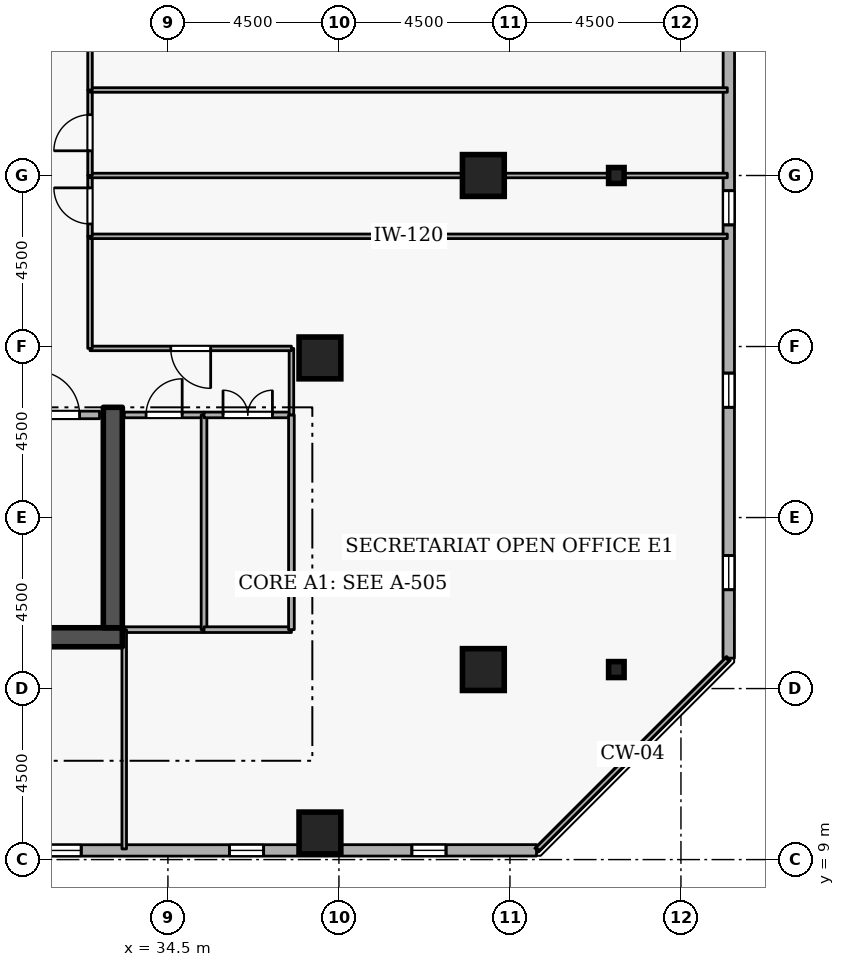
"""IFC4 building model, lengths in metres.
Left out: names, types, materials, properties, quantities, classifications, styles, units other than length and angle.
Written with IfcOpenShell. Run it as: python <this file> out.ifc"""

import sys

from ifc_helpers import new_model, si_unit, direction, frame, frame_2d, origin, origin_2d, place, context, subcontext, project, spatial, rectangle, i_section, extrude, element, fill, save


model = new_model("IFC4")
c1 = context("Model", 3, precision=1e-05, world=origin(), true_north=direction((0.0, 1.0)))
c2 = subcontext(c1, "Body", "Model", "MODEL_VIEW")
j1 = project(units=[si_unit("LENGTHUNIT", "METRE"), si_unit("PLANEANGLEUNIT", "RADIAN")], contexts=[c1])
p1 = place(None, origin())
s1 = spatial("IfcSite", under=j1, at=p1, CompositionType="ELEMENT")
p2 = place(p1, origin())
s2 = spatial("IfcBuilding", under=s1, at=p2, CompositionType="ELEMENT")
p3 = place(p2, frame((0.0, 0.0, 189.3)))
s3 = spatial("IfcBuildingStorey", under=s2, at=p3, CompositionType="ELEMENT", Elevation=189.3)
p4 = place(p3, frame((17.7, 14.85, 0.0), z_axis=(0.0, 0.0, 1.0), x_axis=(1.0, 0.0, 0.0)))
e1 = element("IfcWall", 1, at=p4, inside=s3, PredefinedType="SHEAR", context=c2, shape_type="SweptSolid", body=[
    extrude(rectangle(XDim=15.6, YDim=0.5, at=frame_2d((7.8, 0.0))), origin(), (0.0, 0.0, 1.0), 3.6),
])
p5 = place(p3, frame((33.05, 15.1, 0.0), z_axis=(0.0, 0.0, 1.0), x_axis=(0.0, 1.0, 0.0)))
e2 = element("IfcWall", 2, at=p5, inside=s3, PredefinedType="SHEAR", context=c2, shape_type="SweptSolid", body=[
    extrude(rectangle(XDim=5.8, YDim=0.5, at=frame_2d((2.9, 0.0))), origin(), (0.0, 0.0, 1.0), 3.6),
])
for number, where, z_axis, x_axis in (
    (3, (38.5, 9.7, 0.0), (0.0, 0.0, 1.0), (1.0, 0.0, 0.0)),
    (4, (42.8, 14.0, 0.0), (0.0, 0.0, 1.0), (1.0, 0.0, 0.0)),
    (5, (42.8, 27.0, 0.0), (0.0, 0.0, 1.0), (1.0, 0.0, 0.0)),
    (6, (38.5, 22.2, 0.0), (0.0, 0.0, 1.0), (1.0, 0.0, 0.0)),
):
    element("IfcColumn", number, at=place(p3, frame(where, z_axis=z_axis, x_axis=x_axis)), inside=s3, PredefinedType="COLUMN", context=c2, shape_type="SweptSolid", body=[
        extrude(rectangle(XDim=1.1, YDim=1.1, at=origin_2d()), origin(), (0.0, 0.0, 1.0), 3.6),
    ])
for number, where, z_axis, x_axis in (
    (7, (46.3, 14.0, 0.0), (0.0, 0.0, 1.0), (1.0, 0.0, 0.0)),
    (8, (46.3, 27.0, 0.0), (0.0, 0.0, 1.0), (1.0, 0.0, 0.0)),
):
    element("IfcColumn", number, at=place(p3, frame(where, z_axis=z_axis, x_axis=x_axis)), inside=s3, PredefinedType="COLUMN", context=c2, shape_type="SweptSolid", body=[
        extrude(i_section(OverallWidth=0.407, OverallDepth=0.419, WebThickness=0.031, FlangeThickness=0.049, FilletRadius=0.015, at=origin_2d()), origin(), (0.0, 0.0, 1.0), 3.6),
    ])
p6 = place(p3, frame((10.319, 9.235, 0.0), z_axis=(0.0, 0.0, 1.0), x_axis=(0.999999969988, 0.000244999128, 0.0)))
e9 = element("IfcWall", 9, at=p6, inside=s3, PredefinedType="STANDARD", context=c2, shape_type="SweptSolid", body=[
    extrude(rectangle(XDim=33.881, YDim=0.3, at=frame_2d((16.94, 0.0))), origin(), (0.0, 0.0, 1.0), 2.7),
])
p7 = place(p6, frame((6.6, 0.0, 0.72)))
e10 = element("IfcOpeningElement", 10, at=p7, cuts=e9, PredefinedType="OPENING", context=c2, shape_type="SweptSolid", body=[
    extrude(rectangle(XDim=0.9, YDim=1.75, at=frame_2d((0.45, 0.875))), frame((0.0, 0.16, 0.0), z_axis=(0.0, -1.0, 0.0), x_axis=(1.0, 0.0, 0.0)), (0.0, 0.0, 1.0), 0.32),
])
p8 = place(p6, frame((11.4, 0.0, 0.72)))
e11 = element("IfcOpeningElement", 11, at=p8, cuts=e9, PredefinedType="OPENING", context=c2, shape_type="SweptSolid", body=[
    extrude(rectangle(XDim=0.9, YDim=1.75, at=frame_2d((0.45, 0.875))), frame((0.0, 0.16, 0.0), z_axis=(0.0, -1.0, 0.0), x_axis=(1.0, 0.0, 0.0)), (0.0, 0.0, 1.0), 0.32),
])
p9 = place(p6, frame((21.0, 0.0, 0.72)))
e12 = element("IfcOpeningElement", 12, at=p9, cuts=e9, PredefinedType="OPENING", context=c2, shape_type="SweptSolid", body=[
    extrude(rectangle(XDim=0.9, YDim=1.75, at=frame_2d((0.45, 0.875))), frame((0.0, 0.16, 0.0), z_axis=(0.0, -1.0, 0.0), x_axis=(1.0, 0.0, 0.0)), (0.0, 0.0, 1.0), 0.32),
])
p10 = place(p6, frame((25.8, 0.0, 0.72)))
e13 = element("IfcOpeningElement", 13, at=p10, cuts=e9, PredefinedType="OPENING", context=c2, shape_type="SweptSolid", body=[
    extrude(rectangle(XDim=0.9, YDim=1.75, at=frame_2d((0.45, 0.875))), frame((0.0, 0.16, 0.0), z_axis=(0.0, -1.0, 0.0), x_axis=(1.0, 0.0, 0.0)), (0.0, 0.0, 1.0), 0.32),
])
p11 = place(p6, frame((30.6, 0.0, 0.72)))
e14 = element("IfcOpeningElement", 14, at=p11, cuts=e9, PredefinedType="OPENING", context=c2, shape_type="SweptSolid", body=[
    extrude(rectangle(XDim=0.9, YDim=1.75, at=frame_2d((0.45, 0.875))), frame((0.0, 0.16, 0.0), z_axis=(0.0, -1.0, 0.0), x_axis=(1.0, 0.0, 0.0)), (0.0, 0.0, 1.0), 0.32),
])
p12 = place(p3, frame((49.256, 14.301, 0.0), z_axis=(0.0, 0.0, 1.0), x_axis=(0.000244999128, 0.999999969988, 0.0)))
e15 = element("IfcWall", 15, at=p12, inside=s3, PredefinedType="STANDARD", context=c2, shape_type="SweptSolid", body=[
    extrude(rectangle(XDim=33.881, YDim=0.3, at=frame_2d((16.94, 0.0))), origin(), (0.0, 0.0, 1.0), 2.7),
])
p13 = place(p12, frame((1.8, 0.0, 0.72)))
e16 = element("IfcOpeningElement", 16, at=p13, cuts=e15, PredefinedType="OPENING", context=c2, shape_type="SweptSolid", body=[
    extrude(rectangle(XDim=0.9, YDim=1.75, at=frame_2d((0.45, 0.875))), frame((0.0, 0.16, 0.0), z_axis=(0.0, -1.0, 0.0), x_axis=(1.0, 0.0, 0.0)), (0.0, 0.0, 1.0), 0.32),
])
p14 = place(p12, frame((6.6, 0.0, 0.72)))
e17 = element("IfcOpeningElement", 17, at=p14, cuts=e15, PredefinedType="OPENING", context=c2, shape_type="SweptSolid", body=[
    extrude(rectangle(XDim=0.9, YDim=1.75, at=frame_2d((0.45, 0.875))), frame((0.0, 0.16, 0.0), z_axis=(0.0, -1.0, 0.0), x_axis=(1.0, 0.0, 0.0)), (0.0, 0.0, 1.0), 0.32),
])
p15 = place(p12, frame((11.4, 0.0, 0.72)))
e18 = element("IfcOpeningElement", 18, at=p15, cuts=e15, PredefinedType="OPENING", context=c2, shape_type="SweptSolid", body=[
    extrude(rectangle(XDim=0.9, YDim=1.75, at=frame_2d((0.45, 0.875))), frame((0.0, 0.16, 0.0), z_axis=(0.0, -1.0, 0.0), x_axis=(1.0, 0.0, 0.0)), (0.0, 0.0, 1.0), 0.32),
])
p16 = place(p12, frame((16.2, 0.0, 0.72)))
e19 = element("IfcOpeningElement", 19, at=p16, cuts=e15, PredefinedType="OPENING", context=c2, shape_type="SweptSolid", body=[
    extrude(rectangle(XDim=0.9, YDim=1.75, at=frame_2d((0.45, 0.875))), frame((0.0, 0.16, 0.0), z_axis=(0.0, -1.0, 0.0), x_axis=(1.0, 0.0, 0.0)), (0.0, 0.0, 1.0), 0.32),
])
p17 = place(p12, frame((21.0, 0.0, 0.72)))
e20 = element("IfcOpeningElement", 20, at=p17, cuts=e15, PredefinedType="OPENING", context=c2, shape_type="SweptSolid", body=[
    extrude(rectangle(XDim=0.9, YDim=1.75, at=frame_2d((0.45, 0.875))), frame((0.0, 0.16, 0.0), z_axis=(0.0, -1.0, 0.0), x_axis=(1.0, 0.0, 0.0)), (0.0, 0.0, 1.0), 0.32),
])
p18 = place(p12, frame((25.8, 0.0, 0.72)))
e21 = element("IfcOpeningElement", 21, at=p18, cuts=e15, PredefinedType="OPENING", context=c2, shape_type="SweptSolid", body=[
    extrude(rectangle(XDim=0.9, YDim=1.75, at=frame_2d((0.45, 0.875))), frame((0.0, 0.16, 0.0), z_axis=(0.0, -1.0, 0.0), x_axis=(1.0, 0.0, 0.0)), (0.0, 0.0, 1.0), 0.32),
])
p19 = place(p12, frame((30.6, 0.0, 0.72)))
e22 = element("IfcOpeningElement", 22, at=p19, cuts=e15, PredefinedType="OPENING", context=c2, shape_type="SweptSolid", body=[
    extrude(rectangle(XDim=0.9, YDim=1.75, at=frame_2d((0.45, 0.875))), frame((0.0, 0.16, 0.0), z_axis=(0.0, -1.0, 0.0), x_axis=(1.0, 0.0, 0.0)), (0.0, 0.0, 1.0), 0.32),
])
p20 = place(p3, frame((30.5, 20.7, 0.0), z_axis=(0.0, 0.0, 1.0), x_axis=(1.0, 0.0, 0.0)))
e23 = element("IfcWall", 23, at=p20, inside=s3, PredefinedType="STANDARD", context=c2, shape_type="SweptSolid", body=[
    extrude(rectangle(XDim=2.2, YDim=0.2, at=frame_2d((1.1, 0.0))), origin(), (0.0, 0.0, 1.0), 3.34),
])
p21 = place(p20, frame((0.525, 0.0, 0.0)))
e24 = element("IfcOpeningElement", 24, at=p21, cuts=e23, PredefinedType="OPENING", context=c2, shape_type="SweptSolid", body=[
    extrude(rectangle(XDim=1.15, YDim=2.1, at=frame_2d((0.575, 1.05))), frame((0.0, 0.11, 0.0), z_axis=(0.0, -1.0, 0.0), x_axis=(1.0, 0.0, 0.0)), (0.0, 0.0, 1.0), 0.22),
])
p22 = place(p3, frame((35.45, 15.05, 0.0), z_axis=(0.0, 0.0, 1.0), x_axis=(-1.0, 0.0, 0.0)))
e25 = element("IfcWall", 25, at=p22, inside=s3, PredefinedType="PARTITIONING", context=c2, shape_type="SweptSolid", body=[
    extrude(rectangle(XDim=2.1, YDim=0.15, at=frame_2d((1.05, 0.0))), origin(), (0.0, 0.0, 1.0), 3.34),
])
p23 = place(p3, frame((33.35, 20.7, 0.0), z_axis=(0.0, 0.0, 1.0), x_axis=(1.0, 0.0, 0.0)))
e26 = element("IfcWall", 26, at=p23, inside=s3, PredefinedType="PARTITIONING", context=c2, shape_type="SweptSolid", body=[
    extrude(rectangle(XDim=2.1, YDim=0.15, at=frame_2d((1.05, 0.0))), origin(), (0.0, 0.0, 1.0), 3.34),
])
p24 = place(p23, frame((0.575, 0.0, 0.0)))
e27 = element("IfcOpeningElement", 27, at=p24, cuts=e26, PredefinedType="OPENING", context=c2, shape_type="SweptSolid", body=[
    extrude(rectangle(XDim=0.95, YDim=2.1, at=frame_2d((0.475, 1.05))), frame((0.0, 0.085, 0.0), z_axis=(0.0, -1.0, 0.0), x_axis=(1.0, 0.0, 0.0)), (0.0, 0.0, 1.0), 0.17),
])
p25 = place(p3, frame((35.45, 20.7, 0.0), z_axis=(0.0, 0.0, 1.0), x_axis=(0.0, -1.0, 0.0)))
e28 = element("IfcWall", 28, at=p25, inside=s3, PredefinedType="PARTITIONING", context=c2, shape_type="SweptSolid", body=[
    extrude(rectangle(XDim=5.65, YDim=0.15, at=frame_2d((2.825, 0.0))), origin(), (0.0, 0.0, 1.0), 3.34),
])
p26 = place(p3, frame((37.75, 15.05, 0.0), z_axis=(0.0, 0.0, 1.0), x_axis=(-1.0, 0.0, 0.0)))
e29 = element("IfcWall", 29, at=p26, inside=s3, PredefinedType="PARTITIONING", context=c2, shape_type="SweptSolid", body=[
    extrude(rectangle(XDim=2.3, YDim=0.15, at=frame_2d((1.15, 0.0))), origin(), (0.0, 0.0, 1.0), 3.34),
])
p27 = place(p3, frame((35.45, 20.7, 0.0), z_axis=(0.0, 0.0, 1.0), x_axis=(1.0, 0.0, 0.0)))
e30 = element("IfcWall", 30, at=p27, inside=s3, PredefinedType="PARTITIONING", context=c2, shape_type="SweptSolid", body=[
    extrude(rectangle(XDim=2.3, YDim=0.15, at=frame_2d((1.15, 0.0))), origin(), (0.0, 0.0, 1.0), 3.34),
])
p28 = place(p27, frame((0.5, 0.0, 0.0)))
e31 = element("IfcOpeningElement", 31, at=p28, cuts=e30, PredefinedType="OPENING", context=c2, shape_type="SweptSolid", body=[
    extrude(rectangle(XDim=1.3, YDim=2.12, at=frame_2d((0.65, 1.06))), frame((0.0, 0.085, 0.0), z_axis=(0.0, -1.0, 0.0), x_axis=(1.0, 0.0, 0.0)), (0.0, 0.0, 1.0), 0.17),
])
p29 = place(p3, frame((37.75, 20.7, 0.0), z_axis=(0.0, 0.0, 1.0), x_axis=(0.0, -1.0, 0.0)))
e32 = element("IfcWall", 32, at=p29, inside=s3, PredefinedType="PARTITIONING", context=c2, shape_type="SweptSolid", body=[
    extrude(rectangle(XDim=5.65, YDim=0.15, at=frame_2d((2.825, 0.0))), origin(), (0.0, 0.0, 1.0), 3.34),
])
p30 = place(p3, frame((37.75, 20.7, 0.0), z_axis=(0.0, 0.0, 1.0), x_axis=(0.0, 1.0, 0.0)))
e33 = element("IfcWall", 33, at=p30, inside=s3, PredefinedType="PARTITIONING", context=c2, shape_type="SweptSolid", body=[
    extrude(rectangle(XDim=1.75, YDim=0.12, at=frame_2d((0.875, 0.0))), origin(), (0.0, 0.0, 1.0), 3.34),
])
p31 = place(p3, frame((37.75, 22.45, 0.0), z_axis=(0.0, 0.0, 1.0), x_axis=(-1.0, 0.0, 0.0)))
e34 = element("IfcWall", 34, at=p31, inside=s3, PredefinedType="PARTITIONING", context=c2, shape_type="SweptSolid", body=[
    extrude(rectangle(XDim=5.3, YDim=0.12, at=frame_2d((2.65, 0.0))), origin(), (0.0, 0.0, 1.0), 3.34),
])
p32 = place(p31, frame((2.125, 0.0, 0.0)))
e35 = element("IfcOpeningElement", 35, at=p32, cuts=e34, PredefinedType="OPENING", context=c2, shape_type="SweptSolid", body=[
    extrude(rectangle(XDim=1.05, YDim=2.1, at=frame_2d((0.525, 1.05))), frame((0.0, 0.07, 0.0), z_axis=(0.0, -1.0, 0.0), x_axis=(1.0, 0.0, 0.0)), (0.0, 0.0, 1.0), 0.14),
])
p33 = place(p3, frame((32.45, 22.45, 0.0), z_axis=(0.0, 0.0, 1.0), x_axis=(0.0, 1.0, 0.0)))
e36 = element("IfcWall", 36, at=p33, inside=s3, PredefinedType="PARTITIONING", context=c2, shape_type="SweptSolid", body=[
    extrude(rectangle(XDim=2.95, YDim=0.12, at=frame_2d((1.475, 0.0))), origin(), (0.0, 0.0, 1.0), 3.34),
])
p34 = place(p3, frame((32.45, 25.4, 0.0), z_axis=(0.0, 0.0, 1.0), x_axis=(1.0, 0.0, 0.0)))
e37 = element("IfcWall", 37, at=p34, inside=s3, PredefinedType="PARTITIONING", context=c2, shape_type="SweptSolid", body=[
    extrude(rectangle(XDim=16.77, YDim=0.12, at=frame_2d((8.385, 0.0))), origin(), (0.0, 0.0, 1.0), 3.34),
])
p35 = place(p3, frame((49.22, 14.267, 0.0), z_axis=(0.0, 0.0, 1.0), x_axis=(-0.707106781187, -0.707106781187, 0.0)))
e38 = element("IfcWall", 38, at=p35, inside=s3, PredefinedType="PARTITIONING", context=c2, shape_type="SweptSolid", body=[
    extrude(rectangle(XDim=7.052, YDim=0.12, at=frame_2d((3.526, 0.0))), origin(), (0.0, 0.0, 1.0), 3.34),
])
p36 = place(p3, frame((33.35, 9.28, 0.0), z_axis=(0.0, 0.0, 1.0), x_axis=(0.0, 1.0, 0.0)))
e39 = element("IfcWall", 39, at=p36, inside=s3, PredefinedType="PARTITIONING", context=c2, shape_type="SweptSolid", body=[
    extrude(rectangle(XDim=5.77, YDim=0.12, at=frame_2d((2.885, 0.0))), origin(), (0.0, 0.0, 1.0), 2.545),
])
p37 = place(p3, frame((32.45, 25.4, 0.0), z_axis=(0.0, 0.0, 1.0), x_axis=(0.0, 1.0, 0.0)))
e40 = element("IfcWall", 40, at=p37, inside=s3, PredefinedType="PARTITIONING", context=c2, shape_type="SweptSolid", body=[
    extrude(rectangle(XDim=1.6, YDim=0.12, at=frame_2d((0.8, 0.0))), origin(), (0.0, 0.0, 1.0), 3.34),
])
p38 = place(p37, frame((0.325, 0.0, 0.0)))
e41 = element("IfcOpeningElement", 41, at=p38, cuts=e40, PredefinedType="OPENING", context=c2, shape_type="SweptSolid", body=[
    extrude(rectangle(XDim=0.95, YDim=2.1, at=frame_2d((0.475, 1.05))), frame((0.0, 0.07, 0.0), z_axis=(0.0, -1.0, 0.0), x_axis=(1.0, 0.0, 0.0)), (0.0, 0.0, 1.0), 0.14),
])
p39 = place(p3, frame((32.45, 27.0, 0.0), z_axis=(0.0, 0.0, 1.0), x_axis=(1.0, 0.0, 0.0)))
e42 = element("IfcWall", 42, at=p39, inside=s3, PredefinedType="PARTITIONING", context=c2, shape_type="SweptSolid", body=[
    extrude(rectangle(XDim=16.77, YDim=0.12, at=frame_2d((8.385, 0.0))), origin(), (0.0, 0.0, 1.0), 2.878),
])
p40 = place(p3, frame((32.45, 27.0, 0.0), z_axis=(0.0, 0.0, 1.0), x_axis=(0.0, 1.0, 0.0)))
e43 = element("IfcWall", 43, at=p40, inside=s3, PredefinedType="PARTITIONING", context=c2, shape_type="SweptSolid", body=[
    extrude(rectangle(XDim=2.25, YDim=0.12, at=frame_2d((1.125, 0.0))), origin(), (0.0, 0.0, 1.0), 3.34),
])
p41 = place(p40, frame((0.65, 0.0, 0.0)))
e44 = element("IfcOpeningElement", 44, at=p41, cuts=e43, PredefinedType="OPENING", context=c2, shape_type="SweptSolid", body=[
    extrude(rectangle(XDim=0.95, YDim=2.1, at=frame_2d((0.475, 1.05))), frame((0.0, 0.07, 0.0), z_axis=(0.0, -1.0, 0.0), x_axis=(1.0, 0.0, 0.0)), (0.0, 0.0, 1.0), 0.14),
])
p42 = place(p3, frame((32.45, 29.25, 0.0), z_axis=(0.0, 0.0, 1.0), x_axis=(1.0, 0.0, 0.0)))
e45 = element("IfcWall", 45, at=p42, inside=s3, PredefinedType="PARTITIONING", context=c2, shape_type="SweptSolid", body=[
    extrude(rectangle(XDim=16.77, YDim=0.12, at=frame_2d((8.385, 0.0))), origin(), (0.0, 0.0, 1.0), 3.34),
])
p43 = place(p3, frame((32.45, 29.25, 0.0), z_axis=(0.0, 0.0, 1.0), x_axis=(0.0, 1.0, 0.0)))
e46 = element("IfcWall", 46, at=p43, inside=s3, PredefinedType="PARTITIONING", context=c2, shape_type="SweptSolid", body=[
    extrude(rectangle(XDim=2.3, YDim=0.12, at=frame_2d((1.15, 0.0))), origin(), (0.0, 0.0, 1.0), 3.34),
])
p44 = place(p9, origin())
e47 = element("IfcWindow", 47, at=p44, inside=s3, PartitioningType="SINGLE_PANEL", PredefinedType="WINDOW", context=c2, shape_type="SweptSolid", body=[
    extrude(rectangle(XDim=0.9, YDim=1.75, at=frame_2d((0.45, 0.875))), frame((0.0, 0.03, 0.0), z_axis=(0.0, -1.0, 0.0), x_axis=(1.0, 0.0, 0.0)), (0.0, 0.0, 1.0), 0.06),
])
fill(e12, e47)
p45 = place(p10, origin())
e48 = element("IfcWindow", 48, at=p45, inside=s3, PartitioningType="SINGLE_PANEL", PredefinedType="WINDOW", context=c2, shape_type="SweptSolid", body=[
    extrude(rectangle(XDim=0.9, YDim=1.75, at=frame_2d((0.45, 0.875))), frame((0.0, 0.03, 0.0), z_axis=(0.0, -1.0, 0.0), x_axis=(1.0, 0.0, 0.0)), (0.0, 0.0, 1.0), 0.06),
])
fill(e13, e48)
p46 = place(p11, origin())
e49 = element("IfcWindow", 49, at=p46, inside=s3, PartitioningType="SINGLE_PANEL", PredefinedType="WINDOW", context=c2, shape_type="SweptSolid", body=[
    extrude(rectangle(XDim=0.9, YDim=1.75, at=frame_2d((0.45, 0.875))), frame((0.0, 0.03, 0.0), z_axis=(0.0, -1.0, 0.0), x_axis=(1.0, 0.0, 0.0)), (0.0, 0.0, 1.0), 0.06),
])
fill(e14, e49)
p47 = place(p13, origin())
e50 = element("IfcWindow", 50, at=p47, inside=s3, PartitioningType="SINGLE_PANEL", PredefinedType="WINDOW", context=c2, shape_type="SweptSolid", body=[
    extrude(rectangle(XDim=0.9, YDim=1.75, at=frame_2d((0.45, 0.875))), frame((0.0, 0.03, 0.0), z_axis=(0.0, -1.0, 0.0), x_axis=(1.0, 0.0, 0.0)), (0.0, 0.0, 1.0), 0.06),
])
fill(e16, e50)
p48 = place(p14, origin())
e51 = element("IfcWindow", 51, at=p48, inside=s3, PartitioningType="SINGLE_PANEL", PredefinedType="WINDOW", context=c2, shape_type="SweptSolid", body=[
    extrude(rectangle(XDim=0.9, YDim=1.75, at=frame_2d((0.45, 0.875))), frame((0.0, 0.03, 0.0), z_axis=(0.0, -1.0, 0.0), x_axis=(1.0, 0.0, 0.0)), (0.0, 0.0, 1.0), 0.06),
])
fill(e17, e51)
p49 = place(p15, origin())
e52 = element("IfcWindow", 52, at=p49, inside=s3, PartitioningType="SINGLE_PANEL", PredefinedType="WINDOW", context=c2, shape_type="SweptSolid", body=[
    extrude(rectangle(XDim=0.9, YDim=1.75, at=frame_2d((0.45, 0.875))), frame((0.0, 0.03, 0.0), z_axis=(0.0, -1.0, 0.0), x_axis=(1.0, 0.0, 0.0)), (0.0, 0.0, 1.0), 0.06),
])
fill(e18, e52)
p50 = place(p21, origin())
e53 = element("IfcDoor", 53, at=p50, inside=s3, OperationType="SINGLE_SWING_LEFT", PredefinedType="DOOR", context=c2, shape_type="SweptSolid", body=[
    extrude(rectangle(XDim=1.15, YDim=2.1, at=frame_2d((0.575, 1.05))), frame((0.0, 0.025, 0.0), z_axis=(0.0, -1.0, 0.0), x_axis=(1.0, 0.0, 0.0)), (0.0, 0.0, 1.0), 0.05),
])
fill(e24, e53)
p51 = place(p24, origin())
e54 = element("IfcDoor", 54, at=p51, inside=s3, OperationType="SINGLE_SWING_RIGHT", PredefinedType="DOOR", context=c2, shape_type="SweptSolid", body=[
    extrude(rectangle(XDim=0.95, YDim=2.1, at=frame_2d((0.475, 1.05))), frame((0.0, 0.025, 0.0), z_axis=(0.0, -1.0, 0.0), x_axis=(1.0, 0.0, 0.0)), (0.0, 0.0, 1.0), 0.05),
])
fill(e27, e54)
p52 = place(p28, origin())
e55 = element("IfcDoor", 55, at=p52, inside=s3, OperationType="DOUBLE_DOOR_SINGLE_SWING", PredefinedType="DOOR", context=c2, shape_type="SweptSolid", body=[
    extrude(rectangle(XDim=1.3, YDim=2.12, at=frame_2d((0.65, 1.06))), frame((0.0, 0.025, 0.0), z_axis=(0.0, -1.0, 0.0), x_axis=(1.0, 0.0, 0.0)), (0.0, 0.0, 1.0), 0.05),
])
fill(e31, e55)
p53 = place(p32, origin())
e56 = element("IfcDoor", 56, at=p53, inside=s3, OperationType="SINGLE_SWING_LEFT", PredefinedType="DOOR", context=c2, shape_type="SweptSolid", body=[
    extrude(rectangle(XDim=1.05, YDim=2.1, at=frame_2d((0.525, 1.05))), frame((0.0, 0.025, 0.0), z_axis=(0.0, -1.0, 0.0), x_axis=(1.0, 0.0, 0.0)), (0.0, 0.0, 1.0), 0.05),
])
fill(e35, e56)
p54 = place(p38, origin())
e57 = element("IfcDoor", 57, at=p54, inside=s3, OperationType="SINGLE_SWING_RIGHT", PredefinedType="DOOR", context=c2, shape_type="SweptSolid", body=[
    extrude(rectangle(XDim=0.95, YDim=2.1, at=frame_2d((0.475, 1.05))), frame((0.0, 0.025, 0.0), z_axis=(0.0, -1.0, 0.0), x_axis=(1.0, 0.0, 0.0)), (0.0, 0.0, 1.0), 0.05),
])
fill(e41, e57)
p55 = place(p41, origin())
e58 = element("IfcDoor", 58, at=p55, inside=s3, OperationType="SINGLE_SWING_LEFT", PredefinedType="DOOR", context=c2, shape_type="SweptSolid", body=[
    extrude(rectangle(XDim=0.95, YDim=2.1, at=frame_2d((0.475, 1.05))), frame((0.0, 0.025, 0.0), z_axis=(0.0, -1.0, 0.0), x_axis=(1.0, 0.0, 0.0)), (0.0, 0.0, 1.0), 0.05),
])
fill(e44, e58)
save(model, sys.argv[1])
